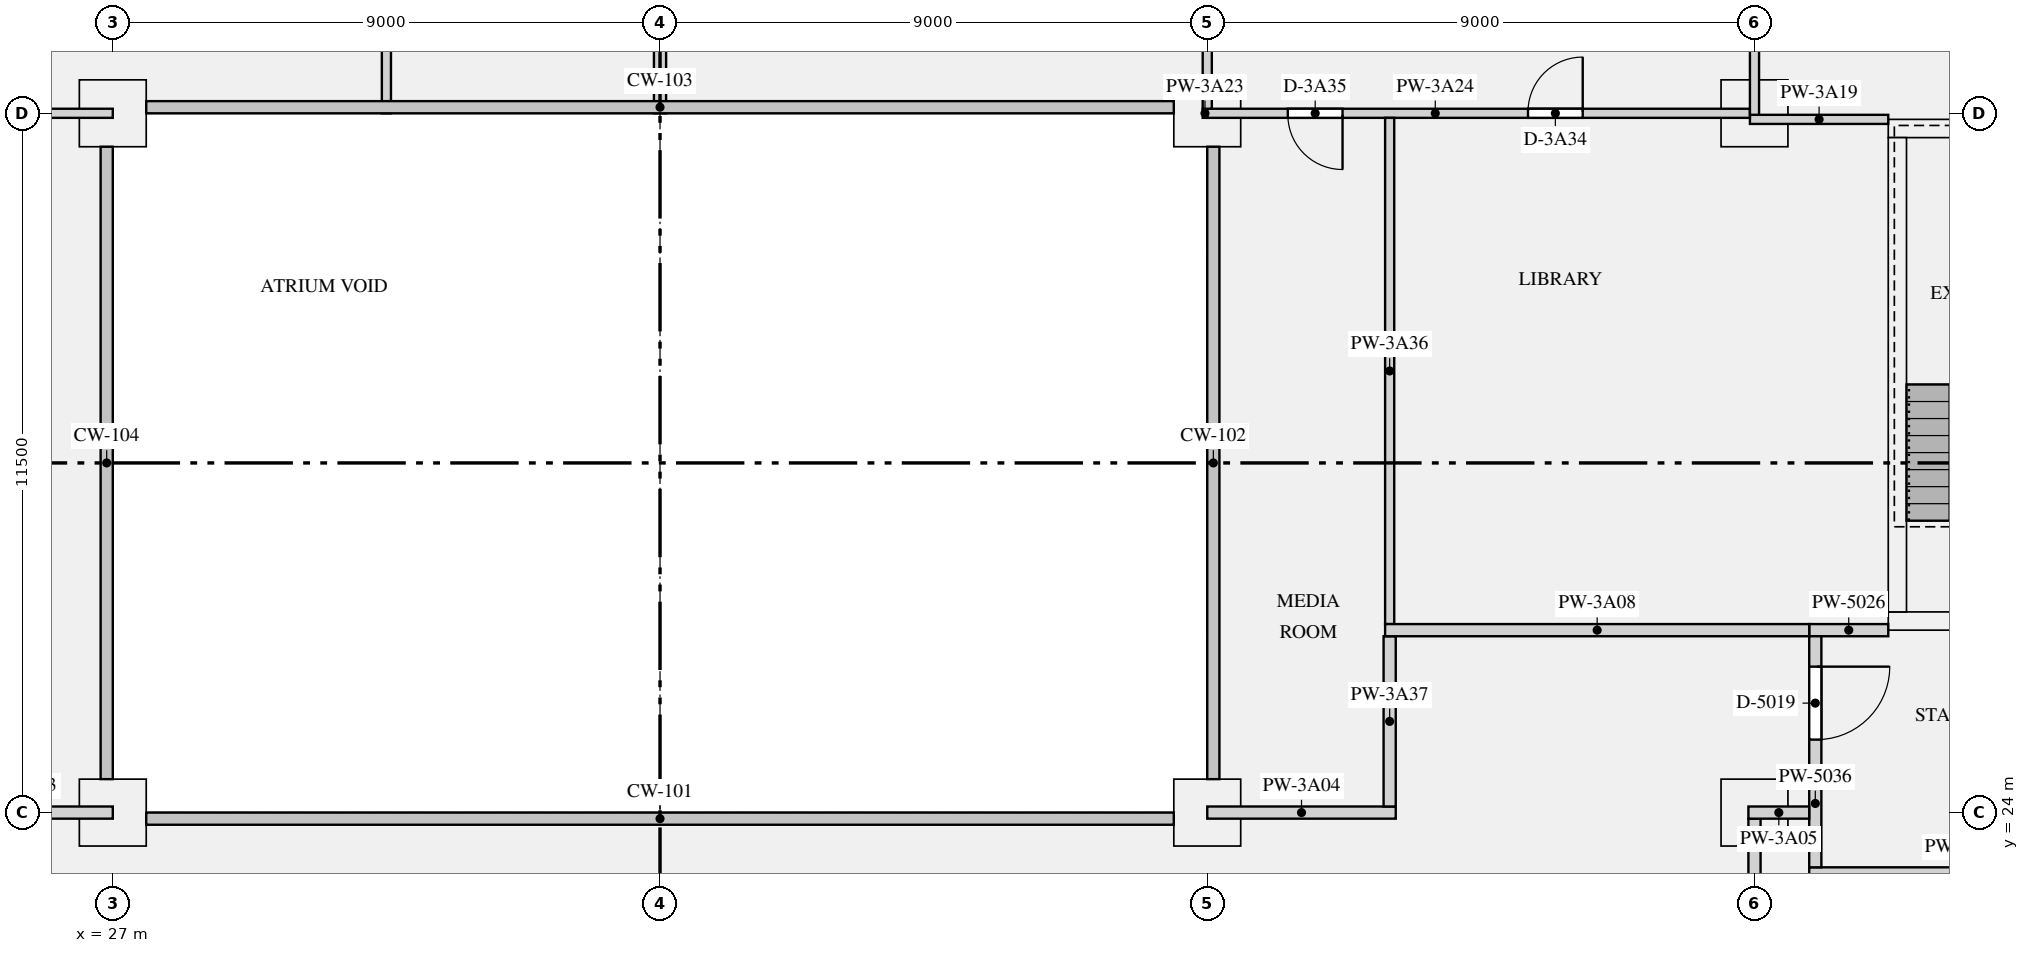
"""IFC4 building model, lengths in metres.
Left out: names, types, materials, properties, quantities, classifications, styles, units other than length and angle.
Written with IfcOpenShell. Run it as: python <this file> out.ifc"""

import sys

from ifc_helpers import new_model, si_unit, direction, frame, frame_2d, origin, origin_2d, place, context, subcontext, project, spatial, rectangle, extrude, element, fill, save


model = new_model("IFC4")
c1 = context("Model", 3, precision=1e-05, world=origin(), true_north=direction((0.0, 1.0)))
c2 = subcontext(c1, "Body", "Model", "MODEL_VIEW")
j1 = project(units=[si_unit("LENGTHUNIT", "METRE"), si_unit("PLANEANGLEUNIT", "RADIAN")], contexts=[c1])
p1 = place(None, origin())
s1 = spatial("IfcSite", under=j1, at=p1, CompositionType="ELEMENT")
p2 = place(p1, origin())
s2 = spatial("IfcBuilding", under=s1, at=p2, CompositionType="ELEMENT")
p3 = place(p2, frame((0.0, 0.0, 141.3)))
s3 = spatial("IfcBuildingStorey", under=s2, at=p3, CompositionType="ELEMENT", Elevation=141.3)
for number, where, z_axis, x_axis in (
    (1, (27.0, 24.0, 0.0), (0.0, 0.0, 1.0), (1.0, 0.0, 0.0)),
    (2, (45.0, 24.0, 0.0), (0.0, 0.0, 1.0), (1.0, 0.0, 0.0)),
    (3, (54.0, 24.0, 0.0), (0.0, 0.0, 1.0), (1.0, 0.0, 0.0)),
    (4, (27.0, 35.5, 0.0), (0.0, 0.0, 1.0), (1.0, 0.0, 0.0)),
    (5, (45.0, 35.5, 0.0), (0.0, 0.0, 1.0), (1.0, 0.0, 0.0)),
    (6, (54.0, 35.5, 0.0), (0.0, 0.0, 1.0), (1.0, 0.0, 0.0)),
):
    element("IfcColumn", number, at=place(p3, frame(where, z_axis=z_axis, x_axis=x_axis)), inside=s3, PredefinedType="COLUMN", context=c2, shape_type="SweptSolid", body=[
        extrude(rectangle(XDim=1.1, YDim=1.1, at=origin_2d()), origin(), (0.0, 0.0, 1.0), 3.15),
    ])
p4 = place(p3, frame((56.2, 27.15, 0.0), z_axis=(0.0, 0.0, 1.0), x_axis=(1.0, 0.0, 0.0)))
e7 = element("IfcWall", 7, at=p4, inside=s3, PredefinedType="SHEAR", context=c2, shape_type="SweptSolid", body=[
    extrude(rectangle(XDim=3.6, YDim=0.3, at=frame_2d((1.8, 0.0))), origin(), (0.0, 0.0, 1.0), 3.15),
])
p5 = place(p4, frame((1.25, 0.0, 0.0)))
e8 = element("IfcOpeningElement", 8, at=p5, cuts=e7, PredefinedType="OPENING", context=c2, shape_type="SweptSolid", body=[
    extrude(rectangle(XDim=1.1, YDim=2.1, at=frame_2d((0.55, 1.05))), frame((0.0, 0.16, 0.0), z_axis=(0.0, -1.0, 0.0), x_axis=(1.0, 0.0, 0.0)), (0.0, 0.0, 1.0), 0.32),
])
p6 = place(p3, frame((56.2, 35.25, 0.0), z_axis=(0.0, 0.0, 1.0), x_axis=(1.0, 0.0, 0.0)))
e9 = element("IfcWall", 9, at=p6, inside=s3, PredefinedType="SHEAR", context=c2, shape_type="SweptSolid", body=[
    extrude(rectangle(XDim=3.6, YDim=0.3, at=frame_2d((1.8, 0.0))), origin(), (0.0, 0.0, 1.0), 3.15),
])
p7 = place(p3, frame((56.35, 27.3, 0.0), z_axis=(0.0, 0.0, 1.0), x_axis=(0.0, 1.0, 0.0)))
e10 = element("IfcWall", 10, at=p7, inside=s3, PredefinedType="SHEAR", context=c2, shape_type="SweptSolid", body=[
    extrude(rectangle(XDim=7.8, YDim=0.3, at=frame_2d((3.9, 0.0))), origin(), (0.0, 0.0, 1.0), 3.15),
])
p8 = place(p3, frame((54.9, 23.0, 0.0), z_axis=(0.0, 0.0, 1.0), x_axis=(1.0, 0.0, 0.0)))
e11 = element("IfcWall", 11, at=p8, inside=s3, PredefinedType="PARTITIONING", context=c2, shape_type="SweptSolid", body=[
    extrude(rectangle(XDim=5.0, YDim=0.2, at=frame_2d((2.5, 0.0))), origin(), (0.0, 0.0, 1.0), 2.83),
])
p9 = place(p3, frame((54.9, 27.0, 0.0), z_axis=(0.0, 0.0, 1.0), x_axis=(1.0, 0.0, 0.0)))
e12 = element("IfcWall", 12, at=p9, inside=s3, PredefinedType="PARTITIONING", context=c2, shape_type="SweptSolid", body=[
    extrude(rectangle(XDim=1.3, YDim=0.2, at=frame_2d((0.65, 0.0))), origin(), (0.0, 0.0, 1.0), 2.83),
])
p10 = place(p3, frame((55.0, 23.1, 0.0), z_axis=(0.0, 0.0, 1.0), x_axis=(0.0, 1.0, 0.0)))
e13 = element("IfcWall", 13, at=p10, inside=s3, PredefinedType="PARTITIONING", context=c2, shape_type="SweptSolid", body=[
    extrude(rectangle(XDim=3.8, YDim=0.2, at=frame_2d((1.9, 0.0))), origin(), (0.0, 0.0, 1.0), 2.83),
])
p11 = place(p10, frame((2.1, 0.0, 0.0)))
e14 = element("IfcOpeningElement", 14, at=p11, cuts=e13, PredefinedType="OPENING", context=c2, shape_type="SweptSolid", body=[
    extrude(rectangle(XDim=1.2, YDim=2.1, at=frame_2d((0.6, 1.05))), frame((0.0, 0.11, 0.0), z_axis=(0.0, -1.0, 0.0), x_axis=(1.0, 0.0, 0.0)), (0.0, 0.0, 1.0), 0.22),
])
for number, where, z_axis, x_axis in (
    (15, (23.9, 24.0, 0.0), (0.0, 0.0, 1.0), (1.0, 0.0, 0.0)),
    (16, (45.0, 24.0, 0.0), (0.0, 0.0, 1.0), (1.0, 0.0, 0.0)),
):
    element("IfcWall", number, at=place(p3, frame(where, z_axis=z_axis, x_axis=x_axis)), inside=s3, PredefinedType="PARTITIONING", context=c2, shape_type="SweptSolid", body=[
        extrude(rectangle(XDim=3.1, YDim=0.2, at=frame_2d((1.55, 0.0))), origin(), (0.0, 0.0, 1.0), 2.83),
    ])
p12 = place(p3, frame((53.9, 24.0, 0.0), z_axis=(0.0, 0.0, 1.0), x_axis=(1.0, 0.0, 0.0)))
e17 = element("IfcWall", 17, at=p12, inside=s3, PredefinedType="PARTITIONING", context=c2, shape_type="SweptSolid", body=[
    extrude(rectangle(XDim=1.0, YDim=0.2, at=frame_2d((0.5, 0.0))), origin(), (0.0, 0.0, 1.0), 2.83),
])
p13 = place(p3, frame((47.925, 27.0, 0.0), z_axis=(0.0, 0.0, 1.0), x_axis=(1.0, 0.0, 0.0)))
e18 = element("IfcWall", 18, at=p13, inside=s3, PredefinedType="PARTITIONING", context=c2, shape_type="SweptSolid", body=[
    extrude(rectangle(XDim=6.975, YDim=0.2, at=frame_2d((3.487, 0.0))), origin(), (0.0, 0.0, 1.0), 2.83),
])
p14 = place(p3, frame((53.925, 35.4, 0.0), z_axis=(0.0, 0.0, 1.0), x_axis=(1.0, 0.0, 0.0)))
e19 = element("IfcWall", 19, at=p14, inside=s3, PredefinedType="PARTITIONING", context=c2, shape_type="SweptSolid", body=[
    extrude(rectangle(XDim=2.275, YDim=0.15, at=frame_2d((1.137, 0.0))), origin(), (0.0, 0.0, 1.0), 2.83),
])
p15 = place(p3, frame((18.075, 35.5, 0.0), z_axis=(0.0, 0.0, 1.0), x_axis=(1.0, 0.0, 0.0)))
e20 = element("IfcWall", 20, at=p15, inside=s3, PredefinedType="PARTITIONING", context=c2, shape_type="SweptSolid", body=[
    extrude(rectangle(XDim=8.925, YDim=0.15, at=frame_2d((4.462, 0.0))), origin(), (0.0, 0.0, 1.0), 2.83),
])
p16 = place(p15, frame((6.4, 0.0, 0.0)))
e21 = element("IfcOpeningElement", 21, at=p16, cuts=e20, PredefinedType="OPENING", context=c2, shape_type="SweptSolid", body=[
    extrude(rectangle(XDim=1.5, YDim=2.1, at=frame_2d((0.75, 1.05))), frame((0.0, 0.085, 0.0), z_axis=(0.0, -1.0, 0.0), x_axis=(1.0, 0.0, 0.0)), (0.0, 0.0, 1.0), 0.17),
])
p17 = place(p3, frame((44.925, 35.5, 0.0), z_axis=(0.0, 0.0, 1.0), x_axis=(1.0, 0.0, 0.0)))
e22 = element("IfcWall", 22, at=p17, inside=s3, PredefinedType="PARTITIONING", context=c2, shape_type="SweptSolid", body=[
    extrude(rectangle(XDim=0.075, YDim=0.15, at=frame_2d((0.038, 0.0))), origin(), (0.0, 0.0, 1.0), 2.83),
])
p18 = place(p3, frame((45.0, 35.5, 0.0), z_axis=(0.0, 0.0, 1.0), x_axis=(1.0, 0.0, 0.0)))
e23 = element("IfcWall", 23, at=p18, inside=s3, PredefinedType="PARTITIONING", context=c2, shape_type="SweptSolid", body=[
    extrude(rectangle(XDim=8.925, YDim=0.15, at=frame_2d((4.462, 0.0))), origin(), (0.0, 0.0, 1.0), 2.83),
])
p19 = place(p18, frame((5.275, 0.0, 0.0)))
e24 = element("IfcOpeningElement", 24, at=p19, cuts=e23, PredefinedType="OPENING", context=c2, shape_type="SweptSolid", body=[
    extrude(rectangle(XDim=0.9, YDim=2.1, at=frame_2d((0.45, 1.05))), frame((0.0, 0.085, 0.0), z_axis=(0.0, -1.0, 0.0), x_axis=(1.0, 0.0, 0.0)), (0.0, 0.0, 1.0), 0.17),
])
p20 = place(p18, frame((1.325, 0.0, 0.0)))
e25 = element("IfcOpeningElement", 25, at=p20, cuts=e23, PredefinedType="OPENING", context=c2, shape_type="SweptSolid", body=[
    extrude(rectangle(XDim=0.9, YDim=2.1, at=frame_2d((0.45, 1.05))), frame((0.0, 0.085, 0.0), z_axis=(0.0, -1.0, 0.0), x_axis=(1.0, 0.0, 0.0)), (0.0, 0.0, 1.0), 0.17),
])
p21 = place(p3, frame((54.0, 35.475, 0.0), z_axis=(0.0, 0.0, 1.0), x_axis=(0.0, 1.0, 0.0)))
e26 = element("IfcWall", 26, at=p21, inside=s3, PredefinedType="PARTITIONING", context=c2, shape_type="SweptSolid", body=[
    extrude(rectangle(XDim=7.325, YDim=0.15, at=frame_2d((3.663, 0.0))), origin(), (0.0, 0.0, 1.0), 2.83),
])
p22 = place(p21, frame((3.275, 0.0, 0.0)))
e27 = element("IfcOpeningElement", 27, at=p22, cuts=e26, PredefinedType="OPENING", context=c2, shape_type="SweptSolid", body=[
    extrude(rectangle(XDim=1.5, YDim=2.1, at=frame_2d((0.75, 1.05))), frame((0.0, 0.085, 0.0), z_axis=(0.0, -1.0, 0.0), x_axis=(1.0, 0.0, 0.0)), (0.0, 0.0, 1.0), 0.17),
])
p23 = place(p3, frame((54.0, 16.1, 0.0), z_axis=(0.0, 0.0, 1.0), x_axis=(0.0, 1.0, 0.0)))
e28 = element("IfcWall", 28, at=p23, inside=s3, PredefinedType="PARTITIONING", context=c2, shape_type="SweptSolid", body=[
    extrude(rectangle(XDim=7.8, YDim=0.2, at=frame_2d((3.9, 0.0))), origin(), (0.0, 0.0, 1.0), 2.83),
])
p24 = place(p23, frame((1.85, 0.0, 0.0)))
e29 = element("IfcOpeningElement", 29, at=p24, cuts=e28, PredefinedType="OPENING", context=c2, shape_type="SweptSolid", body=[
    extrude(rectangle(XDim=1.1, YDim=2.1, at=frame_2d((0.55, 1.05))), frame((0.0, 0.11, 0.0), z_axis=(0.0, -1.0, 0.0), x_axis=(1.0, 0.0, 0.0)), (0.0, 0.0, 1.0), 0.22),
])
p25 = place(p3, frame((48.0, 27.1, 0.0), z_axis=(0.0, 0.0, 1.0), x_axis=(0.0, 1.0, 0.0)))
e30 = element("IfcWall", 30, at=p25, inside=s3, PredefinedType="PARTITIONING", context=c2, shape_type="SweptSolid", body=[
    extrude(rectangle(XDim=8.325, YDim=0.15, at=frame_2d((4.163, 0.0))), origin(), (0.0, 0.0, 1.0), 2.83),
])
p26 = place(p3, frame((48.0, 24.1, 0.0), z_axis=(0.0, 0.0, 1.0), x_axis=(0.0, 1.0, 0.0)))
e31 = element("IfcWall", 31, at=p26, inside=s3, PredefinedType="PARTITIONING", context=c2, shape_type="SweptSolid", body=[
    extrude(rectangle(XDim=2.8, YDim=0.2, at=frame_2d((1.4, 0.0))), origin(), (0.0, 0.0, 1.0), 2.83),
])
p27 = place(p3, frame((31.5, 35.5, 0.0), z_axis=(0.0, 0.0, 1.0), x_axis=(0.0, 1.0, 0.0)))
e32 = element("IfcWall", 32, at=p27, inside=s3, PredefinedType="PARTITIONING", context=c2, shape_type="SweptSolid", body=[
    extrude(rectangle(XDim=7.3, YDim=0.15, at=frame_2d((3.65, 0.0))), origin(), (0.0, 0.0, 1.0), 2.83),
])
p28 = place(p27, frame((3.275, 0.0, 0.0)))
e33 = element("IfcOpeningElement", 33, at=p28, cuts=e32, PredefinedType="OPENING", context=c2, shape_type="SweptSolid", body=[
    extrude(rectangle(XDim=0.9, YDim=2.1, at=frame_2d((0.45, 1.05))), frame((0.0, 0.085, 0.0), z_axis=(0.0, -1.0, 0.0), x_axis=(1.0, 0.0, 0.0)), (0.0, 0.0, 1.0), 0.17),
])
p29 = place(p3, frame((36.0, 35.5, 0.0), z_axis=(0.0, 0.0, 1.0), x_axis=(0.0, 1.0, 0.0)))
e34 = element("IfcWall", 34, at=p29, inside=s3, PredefinedType="PARTITIONING", context=c2, shape_type="SweptSolid", body=[
    extrude(rectangle(XDim=7.3, YDim=0.2, at=frame_2d((3.65, 0.0))), origin(), (0.0, 0.0, 1.0), 2.83),
])
p30 = place(p3, frame((45.0, 35.575, 0.0), z_axis=(0.0, 0.0, 1.0), x_axis=(0.0, 1.0, 0.0)))
e35 = element("IfcWall", 35, at=p30, inside=s3, PredefinedType="PARTITIONING", context=c2, shape_type="SweptSolid", body=[
    extrude(rectangle(XDim=7.225, YDim=0.15, at=frame_2d((3.613, 0.0))), origin(), (0.0, 0.0, 1.0), 2.83),
])
p31 = place(p30, frame((3.175, 0.0, 0.0)))
e36 = element("IfcOpeningElement", 36, at=p31, cuts=e35, PredefinedType="OPENING", context=c2, shape_type="SweptSolid", body=[
    extrude(rectangle(XDim=1.5, YDim=2.1, at=frame_2d((0.75, 1.05))), frame((0.0, 0.085, 0.0), z_axis=(0.0, -1.0, 0.0), x_axis=(1.0, 0.0, 0.0)), (0.0, 0.0, 1.0), 0.17),
])
p32 = place(p11, frame((1.2, 0.0, 0.0), z_axis=(0.0, 0.0, 1.0), x_axis=(-1.0, 0.0, 0.0)))
e37 = element("IfcDoor", 37, at=p32, inside=s3, OperationType="SINGLE_SWING_LEFT", PredefinedType="DOOR", context=c2, shape_type="SweptSolid", body=[
    extrude(rectangle(XDim=1.2, YDim=2.1, at=frame_2d((0.6, 1.05))), frame((0.0, 0.025, 0.0), z_axis=(0.0, -1.0, 0.0), x_axis=(1.0, 0.0, 0.0)), (0.0, 0.0, 1.0), 0.05),
])
fill(e14, e37)
p33 = place(p19, origin())
e38 = element("IfcDoor", 38, at=p33, inside=s3, OperationType="SINGLE_SWING_RIGHT", PredefinedType="DOOR", context=c2, shape_type="SweptSolid", body=[
    extrude(rectangle(XDim=0.9, YDim=2.1, at=frame_2d((0.45, 1.05))), frame((0.0, 0.025, 0.0), z_axis=(0.0, -1.0, 0.0), x_axis=(1.0, 0.0, 0.0)), (0.0, 0.0, 1.0), 0.05),
])
fill(e24, e38)
p34 = place(p20, frame((0.9, 0.0, 0.0), z_axis=(0.0, 0.0, 1.0), x_axis=(-1.0, 0.0, 0.0)))
e39 = element("IfcDoor", 39, at=p34, inside=s3, OperationType="SINGLE_SWING_LEFT", PredefinedType="DOOR", context=c2, shape_type="SweptSolid", body=[
    extrude(rectangle(XDim=0.9, YDim=2.1, at=frame_2d((0.45, 1.05))), frame((0.0, 0.025, 0.0), z_axis=(0.0, -1.0, 0.0), x_axis=(1.0, 0.0, 0.0)), (0.0, 0.0, 1.0), 0.05),
])
fill(e25, e39)
save(model, sys.argv[1])
